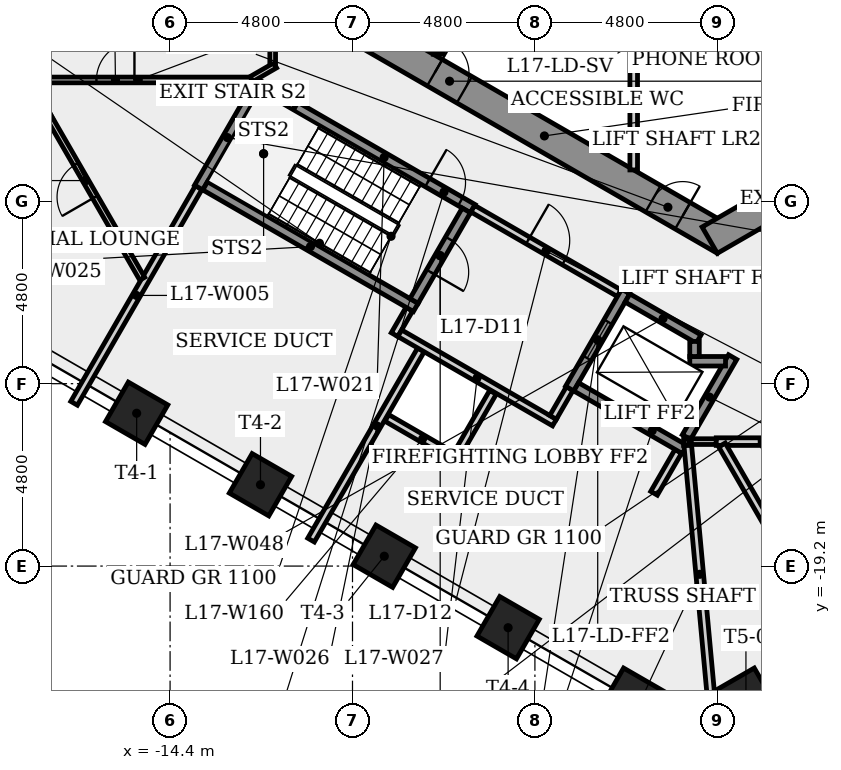
"""IFC4 building model, lengths in metres.
Left out: names, types, materials, properties, quantities, classifications, styles, units other than length and angle.
Written with IfcOpenShell. Run it as: python <this file> out.ifc"""

import sys

from ifc_helpers import new_model, si_unit, direction, frame, frame_2d, origin, origin_2d, place, context, subcontext, project, spatial, rectangle, extrude, element, fill, save


model = new_model("IFC4")
c1 = context("Model", 3, precision=1e-05, world=origin(), true_north=direction((0.0, 1.0)))
c2 = subcontext(c1, "Body", "Model", "MODEL_VIEW")
j1 = project(units=[si_unit("LENGTHUNIT", "METRE"), si_unit("PLANEANGLEUNIT", "RADIAN")], contexts=[c1])
p1 = place(None, origin())
s1 = spatial("IfcSite", under=j1, at=p1, CompositionType="ELEMENT")
p2 = place(p1, origin())
s2 = spatial("IfcBuilding", under=s1, at=p2, CompositionType="ELEMENT")
p3 = place(p2, frame((0.0, 0.0, 66.3)))
s3 = spatial("IfcBuildingStorey", under=s2, at=p3, CompositionType="ELEMENT", Elevation=66.3)
p4 = place(p3, frame((-9.3, -5.138, 0.0), z_axis=(0.0, 0.0, 1.0), x_axis=(0.866023993627, -0.500002442456, 0.0)))
e1 = element("IfcWall", 1, at=p4, inside=s3, PredefinedType="SHEAR", context=c2, shape_type="SweptSolid", body=[
    extrude(rectangle(XDim=10.97, YDim=0.8, at=frame_2d((5.485, 0.0))), origin(), (0.0, 0.0, 1.0), 4.0),
])
p5 = place(p4, frame((2.153, 0.0, 0.0)))
e2 = element("IfcOpeningElement", 2, at=p5, cuts=e1, PredefinedType="OPENING", context=c2, shape_type="SweptSolid", body=[
    extrude(rectangle(XDim=0.9, YDim=2.1, at=frame_2d((0.45, 1.05))), frame((0.0, 0.41, 0.0), z_axis=(0.0, -1.0, 0.0), x_axis=(1.0, 0.0, 0.0)), (0.0, 0.0, 1.0), 0.82),
])
p6 = place(p4, frame((8.787, 0.0, 0.0)))
e3 = element("IfcOpeningElement", 3, at=p6, cuts=e1, PredefinedType="OPENING", context=c2, shape_type="SweptSolid", body=[
    extrude(rectangle(XDim=0.9, YDim=2.1, at=frame_2d((0.45, 1.05))), frame((0.0, 0.41, 0.0), z_axis=(0.0, -1.0, 0.0), x_axis=(1.0, 0.0, 0.0)), (0.0, 0.0, 1.0), 0.82),
])
p7 = place(p3, frame((-0.2, -10.623, 0.0), z_axis=(0.0, 0.0, 1.0), x_axis=(0.866023993627, 0.500002442456, 0.0)))
e4 = element("IfcWall", 4, at=p7, inside=s3, PredefinedType="SHEAR", context=c2, shape_type="SweptSolid", body=[
    extrude(rectangle(XDim=10.97, YDim=0.8, at=frame_2d((5.485, 0.0))), origin(), (0.0, 0.0, 1.0), 4.0),
])
p8 = place(p7, frame((7.57, 0.0, 0.0)))
e5 = element("IfcOpeningElement", 5, at=p8, cuts=e4, PredefinedType="OPENING", context=c2, shape_type="SweptSolid", body=[
    extrude(rectangle(XDim=0.9, YDim=2.1, at=frame_2d((0.45, 1.05))), frame((0.0, 0.41, 0.0), z_axis=(0.0, -1.0, 0.0), x_axis=(1.0, 0.0, 0.0)), (0.0, 0.0, 1.0), 0.82),
])
for number, where, z_axis, x_axis in (
    (6, (-15.28, -15.178, 0.0), (0.0, 0.0, 1.0), (-0.5, -0.866, 0.0)),
    (7, (-12.021, -17.06, 0.0), (0.0, 0.0, 1.0), (-0.5, -0.866, 0.0)),
    (8, (-8.763, -18.94, 0.0), (0.0, 0.0, 1.0), (-0.5, -0.866, 0.0)),
    (9, (-5.505, -20.822, 0.0), (0.0, 0.0, 1.0), (-0.5, -0.866, 0.0)),
    (10, (-2.247, -22.703, 0.0), (0.0, 0.0, 1.0), (-0.5, -0.866, 0.0)),
    (11, (0.753, -22.703, 0.0), (0.0, 0.0, 1.0), (0.5, -0.866, 0.0)),
):
    element("IfcColumn", number, at=place(p3, frame(where, z_axis=z_axis, x_axis=x_axis)), inside=s3, PredefinedType="COLUMN", context=c2, shape_type="SweptSolid", body=[
        extrude(rectangle(XDim=1.2, YDim=1.2, at=origin_2d()), origin(), (0.0, 0.0, 1.0), 4.0),
    ])
p9 = place(p3, frame((-18.228, -6.407, 0.0), z_axis=(0.0, 0.0, 1.0), x_axis=(1.0, 0.0, 0.0)))
e12 = element("IfcWall", 12, at=p9, inside=s3, PredefinedType="PARTITIONING", context=c2, shape_type="SweptSolid", body=[
    extrude(rectangle(XDim=5.981, YDim=0.15, at=frame_2d((2.99, 0.0))), origin(), (0.0, 0.0, 1.0), 3.6),
])
p10 = place(p9, frame((1.89, 0.0, 0.0)))
e13 = element("IfcOpeningElement", 13, at=p10, cuts=e12, PredefinedType="OPENING", context=c2, shape_type="SweptSolid", body=[
    extrude(rectangle(XDim=1.0, YDim=2.1, at=frame_2d((0.5, 1.05))), frame((0.0, 0.085, 0.0), z_axis=(0.0, -1.0, 0.0), x_axis=(1.0, 0.0, 0.0)), (0.0, 0.0, 1.0), 0.17),
])
p11 = place(p3, frame((-16.926, -14.916, 0.0), z_axis=(0.0, 0.0, 1.0), x_axis=(0.499992165211, 0.866029927155, 0.0)))
e14 = element("IfcWall", 14, at=p11, inside=s3, PredefinedType="PLUMBINGWALL", context=c2, shape_type="SweptSolid", body=[
    extrude(rectangle(XDim=6.556, YDim=0.2, at=frame_2d((3.278, 0.0))), origin(), (0.0, 0.0, 1.0), 3.6),
])
p12 = place(p3, frame((-15.133, -11.638, 0.0), z_axis=(0.0, 0.0, 1.0), x_axis=(-0.499995262016, 0.866028139243, 0.0)))
e15 = element("IfcWall", 15, at=p12, inside=s3, PredefinedType="PARTITIONING", context=c2, shape_type="SweptSolid", body=[
    extrude(rectangle(XDim=5.965, YDim=0.15, at=frame_2d((2.982, 0.0))), origin(), (0.0, 0.0, 1.0), 3.6),
])
p13 = place(p12, frame((2.482, 0.0, 0.0)))
e16 = element("IfcOpeningElement", 16, at=p13, cuts=e15, PredefinedType="OPENING", context=c2, shape_type="SweptSolid", body=[
    extrude(rectangle(XDim=1.0, YDim=2.1, at=frame_2d((0.5, 1.05))), frame((0.0, 0.085, 0.0), z_axis=(0.0, -1.0, 0.0), x_axis=(1.0, 0.0, 0.0)), (0.0, 0.0, 1.0), 0.17),
])
p14 = place(p3, frame((-13.648, -9.239, 0.0), z_axis=(0.0, 0.0, 1.0), x_axis=(0.50000556753, 0.866022189346, 0.0)))
e17 = element("IfcWall", 17, at=p14, inside=s3, PredefinedType="SHEAR", context=c2, shape_type="SweptSolid", body=[
    extrude(rectangle(XDim=3.036, YDim=0.25, at=frame_2d((1.518, 0.0))), origin(), (0.0, 0.0, 1.0), 3.6),
])
p15 = place(p3, frame((-12.26, -6.385, 0.0), z_axis=(0.0, 0.0, 1.0), x_axis=(0.865943239699, 0.500142285375, 0.0)))
e18 = element("IfcWall", 18, at=p15, inside=s3, PredefinedType="PARTITIONING", context=c2, shape_type="SweptSolid", body=[
    extrude(rectangle(XDim=0.721, YDim=0.15, at=frame_2d((0.361, 0.0))), origin(), (0.0, 0.0, 1.0), 3.6),
])
p16 = place(p3, frame((-12.085, -6.532, 0.0), z_axis=(0.0, 0.0, 1.0), x_axis=(0.86604373436, -0.499968249168, 0.0)))
e19 = element("IfcWall", 19, at=p16, inside=s3, PredefinedType="SHEAR", context=c2, shape_type="SweptSolid", body=[
    extrude(rectangle(XDim=1.118, YDim=0.25, at=frame_2d((0.559, 0.0))), origin(), (0.0, 0.0, 1.0), 3.6),
])
p17 = place(p3, frame((-11.7, 6.137, 0.0), z_axis=(0.0, 0.0, 1.0), x_axis=(0.0, -1.0, 0.0)))
e20 = element("IfcWall", 20, at=p17, inside=s3, PredefinedType="PARTITIONING", context=c2, shape_type="SweptSolid", body=[
    extrude(rectangle(XDim=12.125, YDim=0.15, at=frame_2d((6.062, 0.0))), origin(), (0.0, 0.0, 1.0), 3.6),
])
p18 = place(p17, frame((6.837, 0.0, 0.0)))
e21 = element("IfcOpeningElement", 21, at=p18, cuts=e20, PredefinedType="OPENING", context=c2, shape_type="SweptSolid", body=[
    extrude(rectangle(XDim=0.9, YDim=2.1, at=frame_2d((0.45, 1.05))), frame((0.0, 0.085, 0.0), z_axis=(0.0, -1.0, 0.0), x_axis=(1.0, 0.0, 0.0)), (0.0, 0.0, 1.0), 0.17),
])
p19 = place(p3, frame((-11.1, -7.101, 0.0), z_axis=(0.0, 0.0, 1.0), x_axis=(0.866028615007, -0.499994437958, 0.0)))
e22 = element("IfcWall", 22, at=p19, inside=s3, PredefinedType="SHEAR", context=c2, shape_type="SweptSolid", body=[
    extrude(rectangle(XDim=5.387, YDim=0.25, at=frame_2d((2.694, 0.0))), origin(), (0.0, 0.0, 1.0), 3.6),
])
p20 = place(p19, frame((4.012, 0.0, 0.0)))
e23 = element("IfcOpeningElement", 23, at=p20, cuts=e22, PredefinedType="OPENING", context=c2, shape_type="SweptSolid", body=[
    extrude(rectangle(XDim=1.0, YDim=2.1, at=frame_2d((0.5, 1.05))), frame((0.0, 0.135, 0.0), z_axis=(0.0, -1.0, 0.0), x_axis=(1.0, 0.0, 0.0)), (0.0, 0.0, 1.0), 0.27),
])
p21 = place(p3, frame((-8.493, -13.11, 0.0), z_axis=(0.0, 0.0, 1.0), x_axis=(0.500067724834, 0.865986299303, 0.0)))
e24 = element("IfcWall", 24, at=p21, inside=s3, PredefinedType="PLUMBINGWALL", context=c2, shape_type="SweptSolid", body=[
    extrude(rectangle(XDim=0.775, YDim=0.2, at=frame_2d((0.388, 0.0))), origin(), (0.0, 0.0, 1.0), 3.6),
])
p22 = place(p3, frame((-7.935, -12.393, 0.0), z_axis=(0.0, 0.0, 1.0), x_axis=(-0.866025499775, 0.499999833739, 0.0)))
e25 = element("IfcWall", 25, at=p22, inside=s3, PredefinedType="SHEAR", context=c2, shape_type="SweptSolid", body=[
    extrude(rectangle(XDim=6.4, YDim=0.25, at=frame_2d((3.2, 0.0))), origin(), (0.0, 0.0, 1.0), 3.6),
])
p23 = place(p3, frame((-7.8, -13.51, 0.0), z_axis=(0.0, 0.0, 1.0), x_axis=(-0.499982030767, -0.866035778077, 0.0)))
e26 = element("IfcWall", 26, at=p23, inside=s3, PredefinedType="PLUMBINGWALL", context=c2, shape_type="SweptSolid", body=[
    extrude(rectangle(XDim=5.781, YDim=0.2, at=frame_2d((2.89, 0.0))), origin(), (0.0, 0.0, 1.0), 3.6),
])
p24 = place(p3, frame((-8.356, -13.073, 0.0), z_axis=(0.0, 0.0, 1.0), x_axis=(0.866038532462, -0.499977259774, 0.0)))
e27 = element("IfcWall", 27, at=p24, inside=s3, PredefinedType="PLUMBINGWALL", context=c2, shape_type="SweptSolid", body=[
    extrude(rectangle(XDim=4.7, YDim=0.2, at=frame_2d((2.35, 0.0))), origin(), (0.0, 0.0, 1.0), 3.6),
])
p25 = place(p3, frame((-7.35, -5.73, 0.0), z_axis=(0.0, 0.0, 1.0), x_axis=(0.0, 1.0, 0.0)))
e28 = element("IfcWall", 28, at=p25, inside=s3, PredefinedType="SHEAR", context=c2, shape_type="SweptSolid", body=[
    extrude(rectangle(XDim=4.055, YDim=0.25, at=frame_2d((2.028, 0.0))), origin(), (0.0, 0.0, 1.0), 3.6),
])
p26 = place(p3, frame((-6.605, -9.841, 0.0), z_axis=(0.0, 0.0, 1.0), x_axis=(-0.499996545922, -0.866027397988, 0.0)))
e29 = element("IfcWall", 29, at=p26, inside=s3, PredefinedType="SHEAR", context=c2, shape_type="SweptSolid", body=[
    extrude(rectangle(XDim=2.75, YDim=0.25, at=frame_2d((1.375, 0.0))), origin(), (0.0, 0.0, 1.0), 3.6),
])
p27 = place(p26, frame((0.875, 0.0, 0.0)))
e30 = element("IfcOpeningElement", 30, at=p27, cuts=e29, PredefinedType="OPENING", context=c2, shape_type="SweptSolid", body=[
    extrude(rectangle(XDim=1.0, YDim=2.1, at=frame_2d((0.5, 1.05))), frame((0.0, 0.135, 0.0), z_axis=(0.0, -1.0, 0.0), x_axis=(1.0, 0.0, 0.0)), (0.0, 0.0, 1.0), 0.27),
])
p28 = place(p3, frame((-6.435, -9.795, 0.0), z_axis=(0.0, 0.0, 1.0), x_axis=(0.866012907634, -0.500021643343, 0.0)))
e31 = element("IfcWall", 31, at=p28, inside=s3, PredefinedType="PARTITIONING", context=c2, shape_type="SweptSolid", body=[
    extrude(rectangle(XDim=4.45, YDim=0.2, at=frame_2d((2.225, 0.0))), origin(), (0.0, 0.0, 1.0), 3.6),
])
p29 = place(p28, frame((1.675, 0.0, 0.0)))
e32 = element("IfcOpeningElement", 32, at=p29, cuts=e31, PredefinedType="OPENING", context=c2, shape_type="SweptSolid", body=[
    extrude(rectangle(XDim=1.1, YDim=2.1, at=frame_2d((0.55, 1.05))), frame((0.0, 0.11, 0.0), z_axis=(0.0, -1.0, 0.0), x_axis=(1.0, 0.0, 0.0)), (0.0, 0.0, 1.0), 0.22),
])
p30 = place(p3, frame((-3.885, -14.529, 0.0), z_axis=(0.0, 0.0, 1.0), x_axis=(-0.499859285417, -0.866106630146, 0.0)))
e33 = element("IfcWall", 33, at=p30, inside=s3, PredefinedType="PLUMBINGWALL", context=c2, shape_type="SweptSolid", body=[
    extrude(rectangle(XDim=0.875, YDim=0.2, at=frame_2d((0.438, 0.0))), origin(), (0.0, 0.0, 1.0), 3.6),
])
p31 = place(p3, frame((-2.41, -11.974, 0.0), z_axis=(0.0, 0.0, 1.0), x_axis=(-0.500001826776, -0.866024349092, 0.0)))
e34 = element("IfcWall", 34, at=p31, inside=s3, PredefinedType="SHEAR", context=c2, shape_type="SweptSolid", body=[
    extrude(rectangle(XDim=2.95, YDim=0.25, at=frame_2d((1.475, 0.0))), origin(), (0.0, 0.0, 1.0), 3.6),
])
p32 = place(p31, frame((0.925, 0.0, 0.0)))
e35 = element("IfcOpeningElement", 35, at=p32, cuts=e34, PredefinedType="OPENING", context=c2, shape_type="SweptSolid", body=[
    extrude(rectangle(XDim=1.1, YDim=2.1, at=frame_2d((0.55, 1.05))), frame((0.0, 0.135, 0.0), z_axis=(0.0, -1.0, 0.0), x_axis=(1.0, 0.0, 0.0)), (0.0, 0.0, 1.0), 0.27),
])
p33 = place(p3, frame((-2.364, -12.145, 0.0), z_axis=(0.0, 0.0, 1.0), x_axis=(0.86603892542, -0.499976579108, 0.0)))
e36 = element("IfcWall", 36, at=p33, inside=s3, PredefinedType="SHEAR", context=c2, shape_type="SweptSolid", body=[
    extrude(rectangle(XDim=2.162, YDim=0.25, at=frame_2d((1.081, 0.0))), origin(), (0.0, 0.0, 1.0), 3.6),
])
p34 = place(p3, frame((-2.2, -5.275, 0.0), z_axis=(0.0, 0.0, 1.0), x_axis=(0.0, -1.0, 0.0)))
e37 = element("IfcWall", 37, at=p34, inside=s3, PredefinedType="PARTITIONING", context=c2, shape_type="SweptSolid", body=[
    extrude(rectangle(XDim=3.501, YDim=0.2, at=frame_2d((1.75, 0.0))), origin(), (0.0, 0.0, 1.0), 3.6),
])
p35 = place(p3, frame((-1.027, -16.179, 0.0), z_axis=(0.0, 0.0, 1.0), x_axis=(-0.500048109927, -0.865997625723, 0.0)))
e38 = element("IfcWall", 38, at=p35, inside=s3, PredefinedType="PLUMBINGWALL", context=c2, shape_type="SweptSolid", body=[
    extrude(rectangle(XDim=1.276, YDim=0.2, at=frame_2d((0.638, 0.0))), origin(), (0.0, 0.0, 1.0), 3.6),
])
p36 = place(p3, frame((-0.856, -16.133, 0.0), z_axis=(0.0, 0.0, 1.0), x_axis=(-0.866021716278, 0.500006386895, 0.0)))
e39 = element("IfcWall", 39, at=p36, inside=s3, PredefinedType="SHEAR", context=c2, shape_type="SweptSolid", body=[
    extrude(rectangle(XDim=3.3, YDim=0.25, at=frame_2d((1.65, 0.0))), origin(), (0.0, 0.0, 1.0), 3.6),
])
p37 = place(p3, frame((-0.812, -15.807, 0.0), z_axis=(0.0, 0.0, 1.0), x_axis=(0.499931139538, 0.866065156741, 0.0)))
e40 = element("IfcWall", 40, at=p37, inside=s3, PredefinedType="SHEAR", context=c2, shape_type="SweptSolid", body=[
    extrude(rectangle(XDim=2.43, YDim=0.25, at=frame_2d((1.215, 0.0))), origin(), (0.0, 0.0, 1.0), 3.6),
])
p38 = place(p3, frame((-0.778, -16.014, 0.0), z_axis=(0.0, 0.0, 1.0), x_axis=(0.092107680548, -0.995749052314, 0.0)))
e41 = element("IfcWall", 41, at=p38, inside=s3, PredefinedType="PLUMBINGWALL", context=c2, shape_type="SweptSolid", body=[
    extrude(rectangle(XDim=6.833, YDim=0.2, at=frame_2d((3.417, 0.0))), origin(), (0.0, 0.0, 1.0), 3.6),
])
p39 = place(p3, frame((-0.886, -15.925, 0.0), z_axis=(0.0, 0.0, 1.0), x_axis=(1.0, 0.0, 0.0)))
e42 = element("IfcWall", 42, at=p39, inside=s3, PredefinedType="PLUMBINGWALL", context=c2, shape_type="SweptSolid", body=[
    extrude(rectangle(XDim=0.131, YDim=0.2, at=frame_2d((0.065, 0.0))), origin(), (0.0, 0.0, 1.0), 3.6),
])
p40 = place(p3, frame((-0.725, -13.81, 0.0), z_axis=(0.0, 0.0, 1.0), x_axis=(1.0, 0.0, 0.0)))
e43 = element("IfcWall", 43, at=p40, inside=s3, PredefinedType="SHEAR", context=c2, shape_type="SweptSolid", body=[
    extrude(rectangle(XDim=0.941, YDim=0.25, at=frame_2d((0.47, 0.0))), origin(), (0.0, 0.0, 1.0), 4.0),
])
p41 = place(p3, frame((-0.6, -13.289, 0.0), z_axis=(0.0, 0.0, 1.0), x_axis=(0.0, -1.0, 0.0)))
e44 = element("IfcWall", 44, at=p41, inside=s3, PredefinedType="SHEAR", context=c2, shape_type="SweptSolid", body=[
    extrude(rectangle(XDim=0.396, YDim=0.25, at=frame_2d((0.198, 0.0))), origin(), (0.0, 0.0, 1.0), 4.0),
])
p42 = place(p3, frame((-0.028, -15.925, 0.0), z_axis=(0.0, 0.0, 1.0), x_axis=(-1.0, 0.0, 0.0)))
e45 = element("IfcWall", 45, at=p42, inside=s3, PredefinedType="PARTITIONING", context=c2, shape_type="SweptSolid", body=[
    extrude(rectangle(XDim=0.659, YDim=0.15, at=frame_2d((0.33, 0.0))), origin(), (0.0, 0.0, 1.0), 3.6),
])
p43 = place(p3, frame((1.177, -15.838, 0.0), z_axis=(0.0, 0.0, 1.0), x_axis=(0.499997225204, -0.866027005808, 0.0)))
e46 = element("IfcWall", 46, at=p43, inside=s3, PredefinedType="PLUMBINGWALL", context=c2, shape_type="SweptSolid", body=[
    extrude(rectangle(XDim=18.818, YDim=0.2, at=frame_2d((9.409, 0.0))), origin(), (0.0, 0.0, 1.0), 3.6),
])
p44 = place(p3, frame((1.127, -15.925, 0.0), z_axis=(0.0, 0.0, 1.0), x_axis=(-1.0, 0.0, 0.0)))
e47 = element("IfcWall", 47, at=p44, inside=s3, PredefinedType="PLUMBINGWALL", context=c2, shape_type="SweptSolid", body=[
    extrude(rectangle(XDim=1.155, YDim=0.2, at=frame_2d((0.577, 0.0))), origin(), (0.0, 0.0, 1.0), 3.6),
])
p45 = place(p3, frame((9.719, -32.635, 0.0), z_axis=(0.0, 0.0, 1.0), x_axis=(-0.499987053718, 0.866032878195, 0.0)))
e48 = element("IfcWall", 48, at=p45, inside=s3, PredefinedType="PLUMBINGWALL", context=c2, shape_type="SweptSolid", body=[
    extrude(rectangle(XDim=19.195, YDim=0.2, at=frame_2d((9.598, 0.0))), origin(), (0.0, 0.0, 1.0), 3.6),
])
p46 = place(p3, frame((-6.808, -16.392, 0.0), z_axis=(0.0, 0.0, 1.0), x_axis=(-0.866008413041, 0.500029427677, 0.0)))
e49 = element("IfcWall", 49, at=p46, inside=s3, PredefinedType="PLUMBINGWALL", context=c2, shape_type="SweptSolid", body=[
    extrude(rectangle(XDim=2.18, YDim=0.2, at=frame_2d((1.09, 0.0))), origin(), (0.0, 0.0, 1.0), 3.6),
])
p47 = place(p3, frame((-5.905, -14.627, 0.0), z_axis=(0.0, 0.0, 1.0), x_axis=(-0.499966013754, -0.866045024864, 0.0)))
e50 = element("IfcWall", 50, at=p47, inside=s3, PredefinedType="PLUMBINGWALL", context=c2, shape_type="SweptSolid", body=[
    extrude(rectangle(XDim=1.88, YDim=0.2, at=frame_2d((0.94, 0.0))), origin(), (0.0, 0.0, 1.0), 3.6),
])
p48 = place(p20, origin())
e51 = element("IfcDoor", 51, at=p48, inside=s3, OperationType="SINGLE_SWING_LEFT", PredefinedType="DOOR", context=c2, shape_type="SweptSolid", body=[
    extrude(rectangle(XDim=1.0, YDim=2.1, at=frame_2d((0.5, 1.05))), frame((0.0, 0.025, 0.0), z_axis=(0.0, -1.0, 0.0), x_axis=(1.0, 0.0, 0.0)), (0.0, 0.0, 1.0), 0.05),
])
fill(e23, e51)
p49 = place(p27, origin())
e52 = element("IfcDoor", 52, at=p49, inside=s3, OperationType="SINGLE_SWING_RIGHT", PredefinedType="DOOR", context=c2, shape_type="SweptSolid", body=[
    extrude(rectangle(XDim=1.0, YDim=2.1, at=frame_2d((0.5, 1.05))), frame((0.0, 0.025, 0.0), z_axis=(0.0, -1.0, 0.0), x_axis=(1.0, 0.0, 0.0)), (0.0, 0.0, 1.0), 0.05),
])
fill(e30, e52)
p50 = place(p29, origin())
e53 = element("IfcDoor", 53, at=p50, inside=s3, OperationType="SINGLE_SWING_LEFT", PredefinedType="DOOR", context=c2, shape_type="SweptSolid", body=[
    extrude(rectangle(XDim=1.1, YDim=2.1, at=frame_2d((0.55, 1.05))), frame((0.0, 0.025, 0.0), z_axis=(0.0, -1.0, 0.0), x_axis=(1.0, 0.0, 0.0)), (0.0, 0.0, 1.0), 0.05),
])
fill(e32, e53)
p51 = place(p32, origin())
e54 = element("IfcDoor", 54, at=p51, inside=s3, OperationType="SLIDING_TO_LEFT", PredefinedType="DOOR", context=c2, shape_type="SweptSolid", body=[
    extrude(rectangle(XDim=1.1, YDim=2.1, at=frame_2d((0.55, 1.05))), frame((0.0, 0.025, 0.0), z_axis=(0.0, -1.0, 0.0), x_axis=(1.0, 0.0, 0.0)), (0.0, 0.0, 1.0), 0.05),
])
fill(e35, e54)
p52 = place(p10, origin())
e55 = element("IfcDoor", 55, at=p52, inside=s3, OperationType="SINGLE_SWING_RIGHT", PredefinedType="DOOR", context=c2, shape_type="SweptSolid", body=[
    extrude(rectangle(XDim=1.0, YDim=2.1, at=frame_2d((0.5, 1.05))), frame((0.0, 0.025, 0.0), z_axis=(0.0, -1.0, 0.0), x_axis=(1.0, 0.0, 0.0)), (0.0, 0.0, 1.0), 0.05),
])
fill(e13, e55)
p53 = place(p13, origin())
e56 = element("IfcDoor", 56, at=p53, inside=s3, OperationType="SINGLE_SWING_LEFT", PredefinedType="DOOR", context=c2, shape_type="SweptSolid", body=[
    extrude(rectangle(XDim=1.0, YDim=2.1, at=frame_2d((0.5, 1.05))), frame((0.0, 0.025, 0.0), z_axis=(0.0, -1.0, 0.0), x_axis=(1.0, 0.0, 0.0)), (0.0, 0.0, 1.0), 0.05),
])
fill(e16, e56)
p54 = place(p5, origin())
e57 = element("IfcDoor", 57, at=p54, inside=s3, OperationType="SINGLE_SWING_LEFT", PredefinedType="DOOR", context=c2, shape_type="SweptSolid", body=[
    extrude(rectangle(XDim=0.9, YDim=2.1, at=frame_2d((0.45, 1.05))), frame((0.0, 0.025, 0.0), z_axis=(0.0, -1.0, 0.0), x_axis=(1.0, 0.0, 0.0)), (0.0, 0.0, 1.0), 0.05),
])
fill(e2, e57)
p55 = place(p6, origin())
e58 = element("IfcDoor", 58, at=p55, inside=s3, OperationType="SINGLE_SWING_RIGHT", PredefinedType="DOOR", context=c2, shape_type="SweptSolid", body=[
    extrude(rectangle(XDim=0.9, YDim=2.1, at=frame_2d((0.45, 1.05))), frame((0.0, 0.025, 0.0), z_axis=(0.0, -1.0, 0.0), x_axis=(1.0, 0.0, 0.0)), (0.0, 0.0, 1.0), 0.05),
])
fill(e3, e58)
save(model, sys.argv[1])
